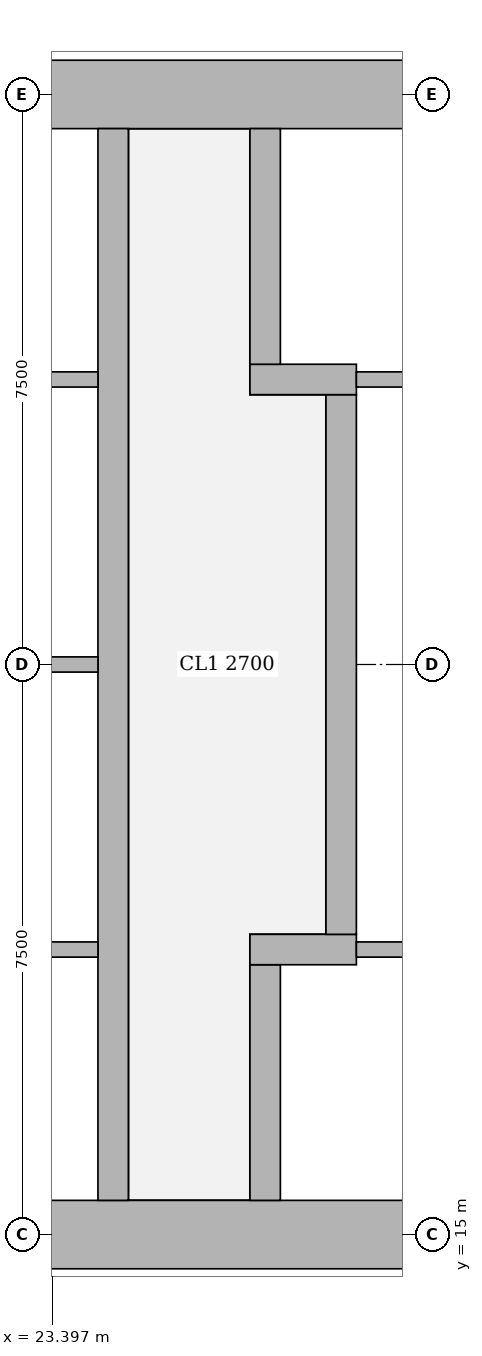
"""IFC4 building model, lengths in metres.
Left out: names, types, materials, properties, quantities, classifications, styles, units other than length and angle.
Written with IfcOpenShell. Run it as: python <this file> out.ifc"""

import sys

from ifc_helpers import new_model, si_unit, direction, frame, frame_2d, origin, place, context, subcontext, project, spatial, rectangle, extrude, element, fill, save


model = new_model("IFC4")
c1 = context("Model", 3, precision=1e-05, world=origin(), true_north=direction((0.0, 1.0)))
c2 = subcontext(c1, "Body", "Model", "MODEL_VIEW")
j1 = project(units=[si_unit("LENGTHUNIT", "METRE"), si_unit("PLANEANGLEUNIT", "RADIAN")], contexts=[c1])
p1 = place(None, origin())
s1 = spatial("IfcSite", under=j1, at=p1, CompositionType="ELEMENT")
p2 = place(p1, origin())
s2 = spatial("IfcBuilding", under=s1, at=p2, CompositionType="ELEMENT")
p3 = place(p2, frame((0.0, 0.0, 216.2)))
s3 = spatial("IfcBuildingStorey", under=s2, at=p3, CompositionType="ELEMENT", Elevation=216.2)
p4 = place(p3, frame((13.95, 15.0, 0.0), z_axis=(0.0, 0.0, 1.0), x_axis=(1.0, 0.0, 0.0)))
e1 = element("IfcWall", 1, at=p4, inside=s3, PredefinedType="SHEAR", context=c2, shape_type="SweptSolid", body=[
    extrude(rectangle(XDim=15.3, YDim=0.9, at=frame_2d((7.65, 0.0))), origin(), (0.0, 0.0, 1.0), 3.75),
])
p5 = place(p4, frame((4.45, 0.0, 0.0)))
e2 = element("IfcOpeningElement", 2, at=p5, cuts=e1, PredefinedType="OPENING", context=c2, shape_type="SweptSolid", body=[
    extrude(rectangle(XDim=1.8, YDim=2.1, at=frame_2d((0.9, 1.05))), frame((0.0, 0.46, 0.0), z_axis=(0.0, -1.0, 0.0), x_axis=(1.0, 0.0, 0.0)), (0.0, 0.0, 1.0), 0.92),
])
p6 = place(p4, frame((10.7, 0.0, 0.0)))
e3 = element("IfcOpeningElement", 3, at=p6, cuts=e1, PredefinedType="OPENING", context=c2, shape_type="SweptSolid", body=[
    extrude(rectangle(XDim=1.1, YDim=2.1, at=frame_2d((0.55, 1.05))), frame((0.0, 0.46, 0.0), z_axis=(0.0, -1.0, 0.0), x_axis=(1.0, 0.0, 0.0)), (0.0, 0.0, 1.0), 0.92),
])
p7 = place(p3, frame((13.95, 30.0, 0.0), z_axis=(0.0, 0.0, 1.0), x_axis=(1.0, 0.0, 0.0)))
e4 = element("IfcWall", 4, at=p7, inside=s3, PredefinedType="SHEAR", context=c2, shape_type="SweptSolid", body=[
    extrude(rectangle(XDim=15.3, YDim=0.9, at=frame_2d((7.65, 0.0))), origin(), (0.0, 0.0, 1.0), 3.75),
])
p8 = place(p7, frame((4.45, 0.0, 0.0)))
e5 = element("IfcOpeningElement", 5, at=p8, cuts=e4, PredefinedType="OPENING", context=c2, shape_type="SweptSolid", body=[
    extrude(rectangle(XDim=1.8, YDim=2.1, at=frame_2d((0.9, 1.05))), frame((0.0, 0.46, 0.0), z_axis=(0.0, -1.0, 0.0), x_axis=(1.0, 0.0, 0.0)), (0.0, 0.0, 1.0), 0.92),
])
p9 = place(p7, frame((10.7, 0.0, 0.0)))
e6 = element("IfcOpeningElement", 6, at=p9, cuts=e4, PredefinedType="OPENING", context=c2, shape_type="SweptSolid", body=[
    extrude(rectangle(XDim=1.1, YDim=2.1, at=frame_2d((0.55, 1.05))), frame((0.0, 0.46, 0.0), z_axis=(0.0, -1.0, 0.0), x_axis=(1.0, 0.0, 0.0)), (0.0, 0.0, 1.0), 0.92),
])
p10 = place(p3, frame((24.2, 15.45, 0.0), z_axis=(0.0, 0.0, 1.0), x_axis=(0.0, 1.0, 0.0)))
e7 = element("IfcWall", 7, at=p10, inside=s3, PredefinedType="SHEAR", context=c2, shape_type="SweptSolid", body=[
    extrude(rectangle(XDim=14.1, YDim=0.4, at=frame_2d((7.05, 0.0))), origin(), (0.0, 0.0, 1.0), 3.75),
])
p11 = place(p3, frame((26.2, 15.45, 0.0), z_axis=(0.0, 0.0, 1.0), x_axis=(0.0, 1.0, 0.0)))
e8 = element("IfcWall", 8, at=p11, inside=s3, PredefinedType="SHEAR", context=c2, shape_type="SweptSolid", body=[
    extrude(rectangle(XDim=3.1, YDim=0.4, at=frame_2d((1.55, 0.0))), origin(), (0.0, 0.0, 1.0), 3.75),
])
p12 = place(p11, frame((0.825, 0.0, 0.0)))
e9 = element("IfcOpeningElement", 9, at=p12, cuts=e8, PredefinedType="OPENING", context=c2, shape_type="SweptSolid", body=[
    extrude(rectangle(XDim=1.2, YDim=2.1, at=frame_2d((0.6, 1.05))), frame((0.0, 0.21, 0.0), z_axis=(0.0, -1.0, 0.0), x_axis=(1.0, 0.0, 0.0)), (0.0, 0.0, 1.0), 0.42),
])
p13 = place(p3, frame((26.0, 18.75, 0.0), z_axis=(0.0, 0.0, 1.0), x_axis=(1.0, 0.0, 0.0)))
e10 = element("IfcWall", 10, at=p13, inside=s3, PredefinedType="SHEAR", context=c2, shape_type="SweptSolid", body=[
    extrude(rectangle(XDim=1.4, YDim=0.4, at=frame_2d((0.7, 0.0))), origin(), (0.0, 0.0, 1.0), 3.75),
])
p14 = place(p3, frame((27.2, 18.95, 0.0), z_axis=(0.0, 0.0, 1.0), x_axis=(0.0, 1.0, 0.0)))
e11 = element("IfcWall", 11, at=p14, inside=s3, PredefinedType="SHEAR", context=c2, shape_type="SweptSolid", body=[
    extrude(rectangle(XDim=7.1, YDim=0.4, at=frame_2d((3.55, 0.0))), origin(), (0.0, 0.0, 1.0), 3.75),
])
p15 = place(p3, frame((26.0, 26.25, 0.0), z_axis=(0.0, 0.0, 1.0), x_axis=(1.0, 0.0, 0.0)))
e12 = element("IfcWall", 12, at=p15, inside=s3, PredefinedType="SHEAR", context=c2, shape_type="SweptSolid", body=[
    extrude(rectangle(XDim=1.4, YDim=0.4, at=frame_2d((0.7, 0.0))), origin(), (0.0, 0.0, 1.0), 3.75),
])
p16 = place(p3, frame((26.2, 26.45, 0.0), z_axis=(0.0, 0.0, 1.0), x_axis=(0.0, 1.0, 0.0)))
e13 = element("IfcWall", 13, at=p16, inside=s3, PredefinedType="SHEAR", context=c2, shape_type="SweptSolid", body=[
    extrude(rectangle(XDim=3.1, YDim=0.4, at=frame_2d((1.55, 0.0))), origin(), (0.0, 0.0, 1.0), 3.75),
])
p17 = place(p16, frame((1.075, 0.0, 0.0)))
e14 = element("IfcOpeningElement", 14, at=p17, cuts=e13, PredefinedType="OPENING", context=c2, shape_type="SweptSolid", body=[
    extrude(rectangle(XDim=1.2, YDim=2.1, at=frame_2d((0.6, 1.05))), frame((0.0, 0.21, 0.0), z_axis=(0.0, -1.0, 0.0), x_axis=(1.0, 0.0, 0.0)), (0.0, 0.0, 1.0), 0.42),
])
for number, where, z_axis, x_axis in (
    (15, (21.8, 18.75, 0.0), (0.0, 0.0, 1.0), (1.0, 0.0, 0.0)),
    (16, (21.8, 22.5, 0.0), (0.0, 0.0, 1.0), (1.0, 0.0, 0.0)),
    (17, (21.8, 26.25, 0.0), (0.0, 0.0, 1.0), (1.0, 0.0, 0.0)),
):
    element("IfcWall", number, at=place(p3, frame(where, z_axis=z_axis, x_axis=x_axis)), inside=s3, PredefinedType="SOLIDWALL", context=c2, shape_type="SweptSolid", body=[
        extrude(rectangle(XDim=2.2, YDim=0.2, at=frame_2d((1.1, 0.0))), origin(), (0.0, 0.0, 1.0), 3.5),
    ])
for number, where, z_axis, x_axis in (
    (18, (27.4, 18.75, 0.0), (0.0, 0.0, 1.0), (1.0, 0.0, 0.0)),
    (19, (27.4, 26.25, 0.0), (0.0, 0.0, 1.0), (1.0, 0.0, 0.0)),
):
    element("IfcWall", number, at=place(p3, frame(where, z_axis=z_axis, x_axis=x_axis)), inside=s3, PredefinedType="SOLIDWALL", context=c2, shape_type="SweptSolid", body=[
        extrude(rectangle(XDim=0.95, YDim=0.2, at=frame_2d((0.475, 0.0))), origin(), (0.0, 0.0, 1.0), 3.5),
    ])
p18 = place(p6, origin())
e20 = element("IfcDoor", 20, at=p18, inside=s3, OperationType="SINGLE_SWING_LEFT", PredefinedType="DOOR", context=c2, shape_type="SweptSolid", body=[
    extrude(rectangle(XDim=1.1, YDim=2.1, at=frame_2d((0.55, 1.05))), frame((0.0, 0.025, 0.0), z_axis=(0.0, -1.0, 0.0), x_axis=(1.0, 0.0, 0.0)), (0.0, 0.0, 1.0), 0.05),
])
fill(e3, e20)
p19 = place(p9, origin())
e21 = element("IfcDoor", 21, at=p19, inside=s3, OperationType="SINGLE_SWING_LEFT", PredefinedType="DOOR", context=c2, shape_type="SweptSolid", body=[
    extrude(rectangle(XDim=1.1, YDim=2.1, at=frame_2d((0.55, 1.05))), frame((0.0, 0.025, 0.0), z_axis=(0.0, -1.0, 0.0), x_axis=(1.0, 0.0, 0.0)), (0.0, 0.0, 1.0), 0.05),
])
fill(e6, e21)
p20 = place(p12, origin())
e22 = element("IfcDoor", 22, at=p20, inside=s3, OperationType="DOUBLE_DOOR_SLIDING", PredefinedType="DOOR", context=c2, shape_type="SweptSolid", body=[
    extrude(rectangle(XDim=1.2, YDim=2.1, at=frame_2d((0.6, 1.05))), frame((0.0, 0.025, 0.0), z_axis=(0.0, -1.0, 0.0), x_axis=(1.0, 0.0, 0.0)), (0.0, 0.0, 1.0), 0.05),
])
fill(e9, e22)
p21 = place(p17, origin())
e23 = element("IfcDoor", 23, at=p21, inside=s3, OperationType="DOUBLE_DOOR_SLIDING", PredefinedType="DOOR", context=c2, shape_type="SweptSolid", body=[
    extrude(rectangle(XDim=1.2, YDim=2.1, at=frame_2d((0.6, 1.05))), frame((0.0, 0.025, 0.0), z_axis=(0.0, -1.0, 0.0), x_axis=(1.0, 0.0, 0.0)), (0.0, 0.0, 1.0), 0.05),
])
fill(e14, e23)
save(model, sys.argv[1])
